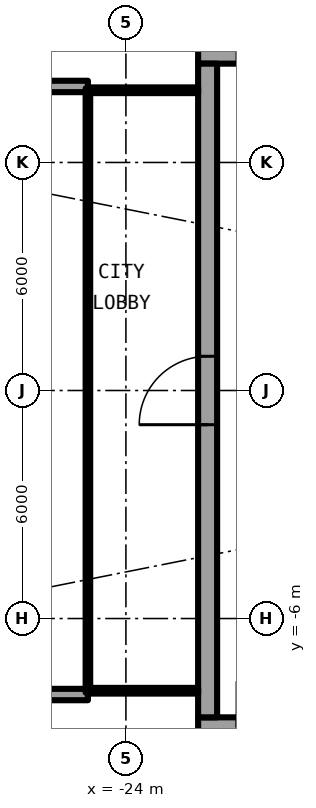
"""IFC4 building model, lengths in metres.
Left out: names, types, materials, properties, quantities, classifications, styles, units other than length and angle.
Written with IfcOpenShell. Run it as: python <this file> out.ifc"""

import sys

from ifc_helpers import new_model, si_unit, direction, frame, frame_2d, origin, place, context, subcontext, project, spatial, rectangle, extrude, element, fill, save


model = new_model("IFC4")
c1 = context("Model", 3, precision=1e-05, world=origin(), true_north=direction((0.0, 1.0)))
c2 = subcontext(c1, "Body", "Model", "MODEL_VIEW")
j1 = project(units=[si_unit("LENGTHUNIT", "METRE"), si_unit("PLANEANGLEUNIT", "RADIAN")], contexts=[c1])
p1 = place(None, origin())
s1 = spatial("IfcSite", under=j1, at=p1, CompositionType="ELEMENT")
p2 = place(p1, origin())
s2 = spatial("IfcBuilding", under=s1, at=p2, CompositionType="ELEMENT")
p3 = place(p2, frame((0.0, 0.0, 151.3)))
s3 = spatial("IfcBuildingStorey", under=s2, at=p3, CompositionType="ELEMENT", Elevation=151.3)
for number, where, z_axis, x_axis in (
    (1, (-25.0, 8.0, 0.0), (0.0, 0.0, 1.0), (-1.0, 0.0, 0.0)),
    (2, (-25.0, -8.0, 0.0), (0.0, 0.0, 1.0), (-1.0, 0.0, 0.0)),
):
    element("IfcWall", number, at=place(p3, frame(where, z_axis=z_axis, x_axis=x_axis)), inside=s3, PredefinedType="SOLIDWALL", context=c2, shape_type="SweptSolid", body=[
        extrude(rectangle(XDim=2.667, YDim=0.3, at=frame_2d((1.333, 0.0))), origin(), (0.0, 0.0, 1.0), 2.7),
    ])
p4 = place(p3, frame((-22.1, -8.85, 0.0), z_axis=(0.0, 0.0, 1.0), x_axis=(1.0, 0.0, 0.0)))
e3 = element("IfcWall", 3, at=p4, inside=s3, PredefinedType="SHEAR", context=c2, shape_type="SweptSolid", body=[
    extrude(rectangle(XDim=13.6, YDim=0.5, at=frame_2d((6.8, 0.0))), origin(), (0.0, 0.0, 1.0), 3.05),
])
p5 = place(p4, frame((1.025, 0.0, 0.0)))
e4 = element("IfcOpeningElement", 4, at=p5, cuts=e3, PredefinedType="OPENING", context=c2, shape_type="SweptSolid", body=[
    extrude(rectangle(XDim=1.2, YDim=2.3, at=frame_2d((0.6, 1.15))), frame((0.0, 0.26, 0.0), z_axis=(0.0, -1.0, 0.0), x_axis=(1.0, 0.0, 0.0)), (0.0, 0.0, 1.0), 0.52),
])
p6 = place(p3, frame((-8.5, 8.85, 0.0), z_axis=(0.0, 0.0, 1.0), x_axis=(-1.0, 0.0, 0.0)))
e5 = element("IfcWall", 5, at=p6, inside=s3, PredefinedType="SHEAR", context=c2, shape_type="SweptSolid", body=[
    extrude(rectangle(XDim=13.6, YDim=0.5, at=frame_2d((6.8, 0.0))), origin(), (0.0, 0.0, 1.0), 3.05),
])
p7 = place(p6, frame((11.375, 0.0, 0.0)))
e6 = element("IfcOpeningElement", 6, at=p7, cuts=e5, PredefinedType="OPENING", context=c2, shape_type="SweptSolid", body=[
    extrude(rectangle(XDim=1.2, YDim=2.3, at=frame_2d((0.6, 1.15))), frame((0.0, 0.26, 0.0), z_axis=(0.0, -1.0, 0.0), x_axis=(1.0, 0.0, 0.0)), (0.0, 0.0, 1.0), 0.52),
])
p8 = place(p3, frame((-21.85, -8.6, 0.0), z_axis=(0.0, 0.0, 1.0), x_axis=(0.0, 1.0, 0.0)))
e7 = element("IfcWall", 7, at=p8, inside=s3, PredefinedType="SHEAR", context=c2, shape_type="SweptSolid", body=[
    extrude(rectangle(XDim=17.2, YDim=0.5, at=frame_2d((8.6, 0.0))), origin(), (0.0, 0.0, 1.0), 3.05),
])
p9 = place(p8, frame((7.7, 0.0, 0.0)))
e8 = element("IfcOpeningElement", 8, at=p9, cuts=e7, PredefinedType="OPENING", context=c2, shape_type="SweptSolid", body=[
    extrude(rectangle(XDim=1.8, YDim=2.3, at=frame_2d((0.9, 1.15))), frame((0.0, 0.26, 0.0), z_axis=(0.0, -1.0, 0.0), x_axis=(1.0, 0.0, 0.0)), (0.0, 0.0, 1.0), 0.52),
])
for number, where, z_axis, x_axis in (
    (9, (-22.1, 7.9, 0.0), (0.0, 0.0, 1.0), (-1.0, 0.0, 0.0)),
    (10, (-22.1, -7.9, 0.0), (0.0, 0.0, 1.0), (-1.0, 0.0, 0.0)),
):
    element("IfcWall", number, at=place(p3, frame(where, z_axis=z_axis, x_axis=x_axis)), inside=s3, PredefinedType="PARTITIONING", context=c2, shape_type="SweptSolid", body=[
        extrude(rectangle(XDim=2.84, YDim=0.15, at=frame_2d((1.42, 0.0))), origin(), (0.0, 0.0, 1.0), 2.7),
    ])
p10 = place(p3, frame((-25.0, 7.95, 0.0), z_axis=(0.0, 0.0, 1.0), x_axis=(0.0, -1.0, 0.0)))
e11 = element("IfcWall", 11, at=p10, inside=s3, PredefinedType="PARTITIONING", context=c2, shape_type="SweptSolid", body=[
    extrude(rectangle(XDim=15.9, YDim=0.12, at=frame_2d((7.95, 0.0))), origin(), (0.0, 0.0, 1.0), 2.7),
])
p11 = place(p10, frame((0.95, 0.0, 0.1)))
e12 = element("IfcOpeningElement", 12, at=p11, cuts=e11, PredefinedType="OPENING", context=c2, shape_type="SweptSolid", body=[
    extrude(rectangle(XDim=14.0, YDim=2.35, at=frame_2d((7.0, 1.175))), frame((0.0, 0.07, 0.0), z_axis=(0.0, -1.0, 0.0), x_axis=(1.0, 0.0, 0.0)), (0.0, 0.0, 1.0), 0.14),
])
p12 = place(p9, origin())
e13 = element("IfcDoor", 13, at=p12, inside=s3, OperationType="SINGLE_SWING_LEFT", PredefinedType="DOOR", context=c2, shape_type="SweptSolid", body=[
    extrude(rectangle(XDim=1.8, YDim=2.3, at=frame_2d((0.9, 1.15))), frame((0.0, 0.025, 0.0), z_axis=(0.0, -1.0, 0.0), x_axis=(1.0, 0.0, 0.0)), (0.0, 0.0, 1.0), 0.05),
])
fill(e8, e13)
p13 = place(p11, origin())
e14 = element("IfcWindow", 14, at=p13, inside=s3, PartitioningType="SINGLE_PANEL", PredefinedType="WINDOW", context=c2, shape_type="SweptSolid", body=[
    extrude(rectangle(XDim=14.0, YDim=2.35, at=frame_2d((7.0, 1.175))), frame((0.0, 0.03, 0.0), z_axis=(0.0, -1.0, 0.0), x_axis=(1.0, 0.0, 0.0)), (0.0, 0.0, 1.0), 0.06),
])
fill(e12, e14)
save(model, sys.argv[1])
